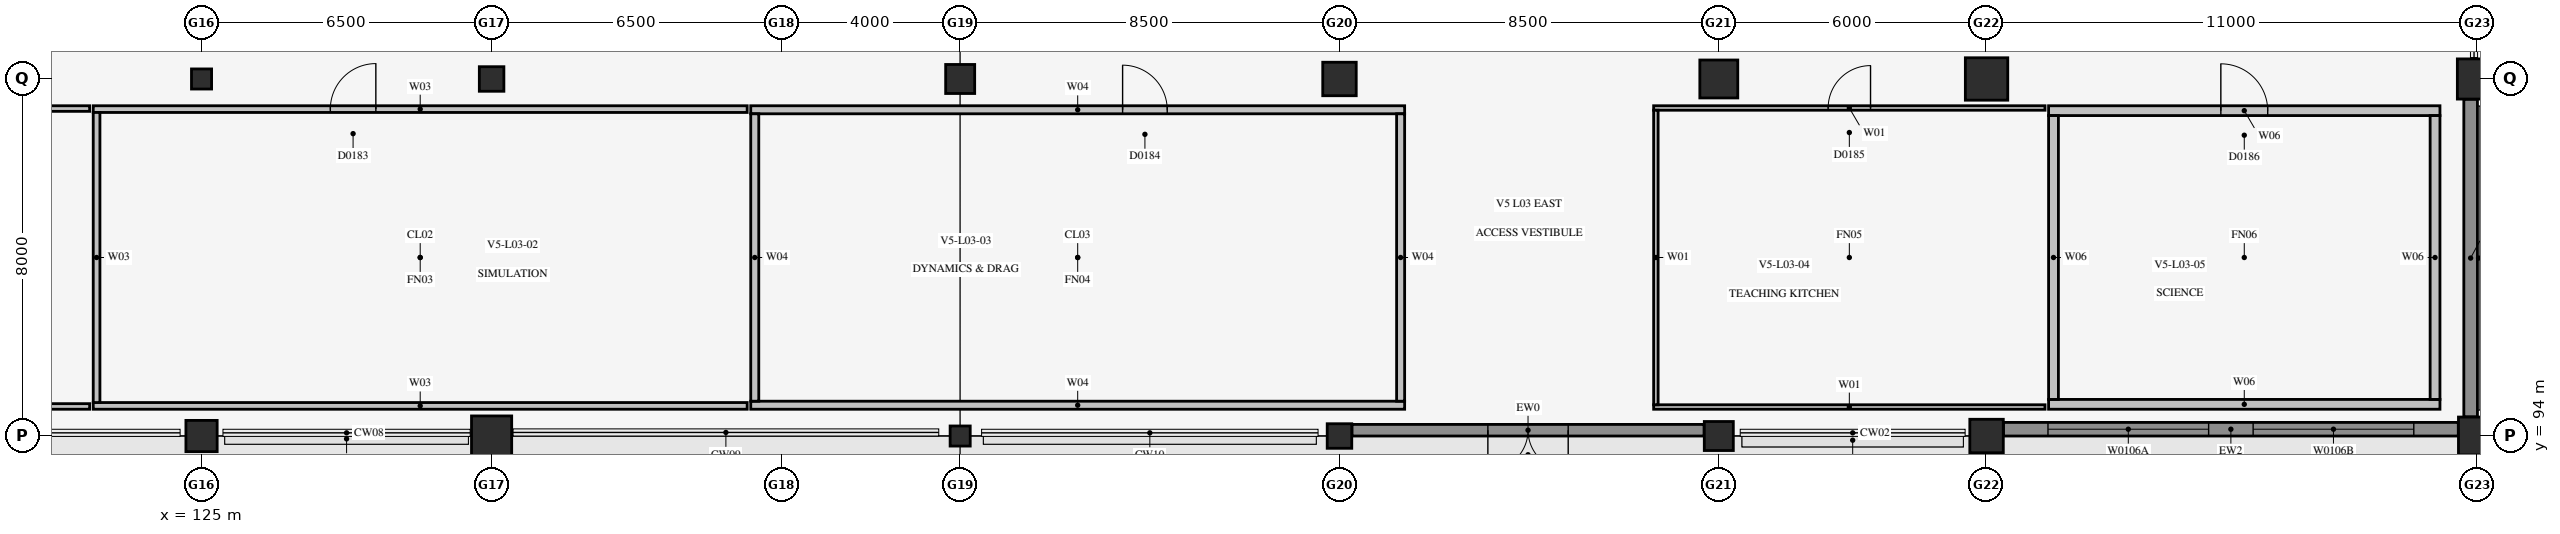
"""IFC4 building model, lengths in metres.
Left out: names, types, materials, properties, quantities, classifications, styles, units other than length and angle.
Written with IfcOpenShell. Run it as: python <this file> out.ifc"""

import sys

from ifc_helpers import new_model, si_unit, direction, frame, frame_2d, origin, origin_2d, place, context, subcontext, project, spatial, rectangle, circle, extrude, element, fill, save


model = new_model("IFC4")
c1 = context("Model", 3, precision=1e-05, world=origin(), true_north=direction((0.0, 1.0)))
c2 = subcontext(c1, "Body", "Model", "MODEL_VIEW")
j1 = project(units=[si_unit("LENGTHUNIT", "METRE"), si_unit("PLANEANGLEUNIT", "RADIAN")], contexts=[c1])
p1 = place(None, origin())
s1 = spatial("IfcSite", under=j1, at=p1, CompositionType="ELEMENT")
p2 = place(p1, origin())
s2 = spatial("IfcBuilding", under=s1, at=p2, CompositionType="ELEMENT")
p3 = place(p2, frame((0.0, 0.0, 14.8)))
s3 = spatial("IfcBuildingStorey", under=s2, at=p3, CompositionType="ELEMENT", Elevation=14.8)
p4 = place(p3, frame((125.0, 94.0, 0.0), z_axis=(0.0, 0.0, 1.0), x_axis=(1.0, 0.0, 0.0)))
e1 = element("IfcColumn", 1, at=p4, inside=s3, PredefinedType="COLUMN", context=c2, shape_type="SweptSolid", body=[
    extrude(circle(Radius=0.35, at=origin_2d()), origin(), (0.0, 0.0, 1.0), 4.2),
])
p5 = place(p3, frame((125.0, 102.0, 0.0), z_axis=(0.0, 0.0, 1.0), x_axis=(1.0, 0.0, 0.0)))
e2 = element("IfcColumn", 2, at=p5, inside=s3, PredefinedType="COLUMN", context=c2, shape_type="SweptSolid", body=[
    extrude(rectangle(XDim=0.45, YDim=0.45, at=origin_2d()), origin(), (0.0, 0.0, 1.0), 4.2),
])
p6 = place(p3, frame((131.5, 94.0, 0.0), z_axis=(0.0, 0.0, 1.0), x_axis=(1.0, 0.0, 0.0)))
e3 = element("IfcColumn", 3, at=p6, inside=s3, PredefinedType="COLUMN", context=c2, shape_type="SweptSolid", body=[
    extrude(circle(Radius=0.45, at=origin_2d()), origin(), (0.0, 0.0, 1.0), 4.2),
])
p7 = place(p3, frame((131.5, 102.0, 0.0), z_axis=(0.0, 0.0, 1.0), x_axis=(1.0, 0.0, 0.0)))
e4 = element("IfcColumn", 4, at=p7, inside=s3, PredefinedType="COLUMN", context=c2, shape_type="SweptSolid", body=[
    extrude(rectangle(XDim=0.55, YDim=0.55, at=origin_2d()), origin(), (0.0, 0.0, 1.0), 4.2),
])
p8 = place(p3, frame((142.0, 94.0, 0.0), z_axis=(0.0, 0.0, 1.0), x_axis=(1.0, 0.0, 0.0)))
e5 = element("IfcColumn", 5, at=p8, inside=s3, PredefinedType="COLUMN", context=c2, shape_type="SweptSolid", body=[
    extrude(rectangle(XDim=0.45, YDim=0.45, at=origin_2d()), origin(), (0.0, 0.0, 1.0), 4.2),
])
p9 = place(p3, frame((142.0, 102.0, 0.0), z_axis=(0.0, 0.0, 1.0), x_axis=(1.0, 0.0, 0.0)))
e6 = element("IfcColumn", 6, at=p9, inside=s3, PredefinedType="COLUMN", context=c2, shape_type="SweptSolid", body=[
    extrude(rectangle(XDim=0.65, YDim=0.65, at=origin_2d()), origin(), (0.0, 0.0, 1.0), 4.2),
])
p10 = place(p3, frame((150.5, 94.0, 0.0), z_axis=(0.0, 0.0, 1.0), x_axis=(1.0, 0.0, 0.0)))
e7 = element("IfcColumn", 7, at=p10, inside=s3, PredefinedType="COLUMN", context=c2, shape_type="SweptSolid", body=[
    extrude(rectangle(XDim=0.55, YDim=0.55, at=origin_2d()), origin(), (0.0, 0.0, 1.0), 4.2),
])
p11 = place(p3, frame((150.5, 102.0, 0.0), z_axis=(0.0, 0.0, 1.0), x_axis=(1.0, 0.0, 0.0)))
e8 = element("IfcColumn", 8, at=p11, inside=s3, PredefinedType="COLUMN", context=c2, shape_type="SweptSolid", body=[
    extrude(rectangle(XDim=0.75, YDim=0.75, at=origin_2d()), origin(), (0.0, 0.0, 1.0), 4.2),
])
p12 = place(p3, frame((159.0, 94.0, 0.0), z_axis=(0.0, 0.0, 1.0), x_axis=(1.0, 0.0, 0.0)))
e9 = element("IfcColumn", 9, at=p12, inside=s3, PredefinedType="COLUMN", context=c2, shape_type="SweptSolid", body=[
    extrude(rectangle(XDim=0.65, YDim=0.65, at=origin_2d()), origin(), (0.0, 0.0, 1.0), 4.2),
])
p13 = place(p3, frame((159.0, 102.0, 0.0), z_axis=(0.0, 0.0, 1.0), x_axis=(1.0, 0.0, 0.0)))
e10 = element("IfcColumn", 10, at=p13, inside=s3, PredefinedType="COLUMN", context=c2, shape_type="SweptSolid", body=[
    extrude(rectangle(XDim=0.85, YDim=0.85, at=origin_2d()), origin(), (0.0, 0.0, 1.0), 4.2),
])
p14 = place(p3, frame((165.0, 94.0, 0.0), z_axis=(0.0, 0.0, 1.0), x_axis=(1.0, 0.0, 0.0)))
e11 = element("IfcColumn", 11, at=p14, inside=s3, PredefinedType="COLUMN", context=c2, shape_type="SweptSolid", body=[
    extrude(rectangle(XDim=0.75, YDim=0.75, at=origin_2d()), origin(), (0.0, 0.0, 1.0), 4.2),
])
p15 = place(p3, frame((165.0, 102.0, 0.0), z_axis=(0.0, 0.0, 1.0), x_axis=(1.0, 0.0, 0.0)))
e12 = element("IfcColumn", 12, at=p15, inside=s3, PredefinedType="COLUMN", context=c2, shape_type="SweptSolid", body=[
    extrude(rectangle(XDim=0.95, YDim=0.95, at=origin_2d()), origin(), (0.0, 0.0, 1.0), 4.2),
])
p16 = place(p3, frame((176.0, 94.0, 0.0), z_axis=(0.0, 0.0, 1.0), x_axis=(1.0, 0.0, 0.0)))
e13 = element("IfcColumn", 13, at=p16, inside=s3, PredefinedType="COLUMN", context=c2, shape_type="SweptSolid", body=[
    extrude(rectangle(XDim=0.85, YDim=0.85, at=origin_2d()), origin(), (0.0, 0.0, 1.0), 4.2),
])
p17 = place(p3, frame((176.0, 102.0, 0.0), z_axis=(0.0, 0.0, 1.0), x_axis=(1.0, 0.0, 0.0)))
e14 = element("IfcColumn", 14, at=p17, inside=s3, PredefinedType="COLUMN", context=c2, shape_type="SweptSolid", body=[
    extrude(rectangle(XDim=0.9, YDim=0.9, at=origin_2d()), origin(), (0.0, 0.0, 1.0), 4.2),
])
p18 = place(p3, frame((107.84, 94.663, 0.0), z_axis=(0.0, 0.0, 1.0), x_axis=(1.0, 0.0, 0.0)))
e15 = element("IfcWall", 15, at=p18, inside=s3, PredefinedType="PARTITIONING", context=c2, shape_type="SweptSolid", body=[
    extrude(rectangle(XDim=14.653, YDim=0.125, at=frame_2d((7.326, 0.0))), origin(), (0.0, 0.0, 1.0), 3.805),
])
p19 = place(p3, frame((107.84, 101.337, 0.0), z_axis=(0.0, 0.0, 1.0), x_axis=(1.0, 0.0, 0.0)))
e16 = element("IfcWall", 16, at=p19, inside=s3, PredefinedType="PARTITIONING", context=c2, shape_type="SweptSolid", body=[
    extrude(rectangle(XDim=14.653, YDim=0.125, at=frame_2d((7.326, 0.0))), origin(), (0.0, 0.0, 1.0), 3.805),
])
p20 = place(p19, frame((3.588, 0.0, 0.0)))
e17 = element("IfcOpeningElement", 17, at=p20, cuts=e16, PredefinedType="OPENING", context=c2, shape_type="SweptSolid", body=[
    extrude(rectangle(XDim=1.4, YDim=2.2, at=frame_2d((0.7, 1.1))), frame((0.0, 0.074, 0.0), z_axis=(0.0, -1.0, 0.0), x_axis=(1.0, 0.0, 0.0)), (0.0, 0.0, 1.0), 0.149),
])
p21 = place(p3, frame((122.573, 94.675, 0.0), z_axis=(0.0, 0.0, 1.0), x_axis=(1.0, 0.0, 0.0)))
e18 = element("IfcWall", 18, at=p21, inside=s3, PredefinedType="PARTITIONING", context=c2, shape_type="SweptSolid", body=[
    extrude(rectangle(XDim=14.654, YDim=0.15, at=frame_2d((7.327, 0.0))), origin(), (0.0, 0.0, 1.0), 3.805),
])
p22 = place(p3, frame((122.573, 101.325, 0.0), z_axis=(0.0, 0.0, 1.0), x_axis=(1.0, 0.0, 0.0)))
e19 = element("IfcWall", 19, at=p22, inside=s3, PredefinedType="PARTITIONING", context=c2, shape_type="SweptSolid", body=[
    extrude(rectangle(XDim=14.654, YDim=0.15, at=frame_2d((7.327, 0.0))), origin(), (0.0, 0.0, 1.0), 3.805),
])
p23 = place(p22, frame((5.313, 0.0, 0.0)))
e20 = element("IfcOpeningElement", 20, at=p23, cuts=e19, PredefinedType="OPENING", context=c2, shape_type="SweptSolid", body=[
    extrude(rectangle(XDim=1.02, YDim=2.2, at=frame_2d((0.51, 1.1))), frame((0.0, 0.087, 0.0), z_axis=(0.0, -1.0, 0.0), x_axis=(1.0, 0.0, 0.0)), (0.0, 0.0, 1.0), 0.174),
])
p24 = place(p3, frame((122.648, 94.75, 0.0), z_axis=(0.0, 0.0, 1.0), x_axis=(0.0, 1.0, 0.0)))
e21 = element("IfcWall", 21, at=p24, inside=s3, PredefinedType="PARTITIONING", context=c2, shape_type="SweptSolid", body=[
    extrude(rectangle(XDim=6.5, YDim=0.15, at=frame_2d((3.25, 0.0))), origin(), (0.0, 0.0, 1.0), 3.805),
])
p25 = place(p3, frame((137.307, 94.69, 0.0), z_axis=(0.0, 0.0, 1.0), x_axis=(1.0, 0.0, 0.0)))
e22 = element("IfcWall", 22, at=p25, inside=s3, PredefinedType="PARTITIONING", context=c2, shape_type="SweptSolid", body=[
    extrude(rectangle(XDim=14.653, YDim=0.18, at=frame_2d((7.327, 0.0))), origin(), (0.0, 0.0, 1.0), 3.805),
])
p26 = place(p3, frame((137.307, 101.31, 0.0), z_axis=(0.0, 0.0, 1.0), x_axis=(1.0, 0.0, 0.0)))
e23 = element("IfcWall", 23, at=p26, inside=s3, PredefinedType="PARTITIONING", context=c2, shape_type="SweptSolid", body=[
    extrude(rectangle(XDim=14.653, YDim=0.18, at=frame_2d((7.327, 0.0))), origin(), (0.0, 0.0, 1.0), 3.805),
])
p27 = place(p26, frame((8.333, 0.0, 0.0)))
e24 = element("IfcOpeningElement", 24, at=p27, cuts=e23, PredefinedType="OPENING", context=c2, shape_type="SweptSolid", body=[
    extrude(rectangle(XDim=1.0, YDim=2.2, at=frame_2d((0.5, 1.1))), frame((0.0, 0.102, 0.0), z_axis=(0.0, -1.0, 0.0), x_axis=(1.0, 0.0, 0.0)), (0.0, 0.0, 1.0), 0.204),
])
for number, where, z_axis, x_axis in (
    (25, (151.87, 94.78, 0.0), (0.0, 0.0, 1.0), (0.0, 1.0, 0.0)),
    (26, (137.397, 94.78, 0.0), (0.0, 0.0, 1.0), (0.0, 1.0, 0.0)),
):
    element("IfcWall", number, at=place(p3, frame(where, z_axis=z_axis, x_axis=x_axis)), inside=s3, PredefinedType="PARTITIONING", context=c2, shape_type="SweptSolid", body=[
        extrude(rectangle(XDim=6.44, YDim=0.18, at=frame_2d((3.22, 0.0))), origin(), (0.0, 0.0, 1.0), 3.805),
    ])
p28 = place(p3, frame((157.54, 94.65, 0.0), z_axis=(0.0, 0.0, 1.0), x_axis=(1.0, 0.0, 0.0)))
e27 = element("IfcWall", 27, at=p28, inside=s3, PredefinedType="PARTITIONING", context=c2, shape_type="SweptSolid", body=[
    extrude(rectangle(XDim=8.77, YDim=0.1, at=frame_2d((4.385, 0.0))), origin(), (0.0, 0.0, 1.0), 3.805),
])
p29 = place(p3, frame((157.54, 101.35, 0.0), z_axis=(0.0, 0.0, 1.0), x_axis=(1.0, 0.0, 0.0)))
e28 = element("IfcWall", 28, at=p29, inside=s3, PredefinedType="PARTITIONING", context=c2, shape_type="SweptSolid", body=[
    extrude(rectangle(XDim=8.77, YDim=0.1, at=frame_2d((4.385, 0.0))), origin(), (0.0, 0.0, 1.0), 3.805),
])
p30 = place(p29, frame((3.91, 0.0, 0.0)))
e29 = element("IfcOpeningElement", 29, at=p30, cuts=e28, PredefinedType="OPENING", context=c2, shape_type="SweptSolid", body=[
    extrude(rectangle(XDim=0.95, YDim=2.15, at=frame_2d((0.475, 1.075))), frame((0.0, 0.062, 0.0), z_axis=(0.0, -1.0, 0.0), x_axis=(1.0, 0.0, 0.0)), (0.0, 0.0, 1.0), 0.124),
])
p31 = place(p3, frame((157.59, 94.7, 0.0), z_axis=(0.0, 0.0, 1.0), x_axis=(0.0, 1.0, 0.0)))
e30 = element("IfcWall", 30, at=p31, inside=s3, PredefinedType="PARTITIONING", context=c2, shape_type="SweptSolid", body=[
    extrude(rectangle(XDim=6.6, YDim=0.1, at=frame_2d((3.3, 0.0))), origin(), (0.0, 0.0, 1.0), 3.805),
])
p32 = place(p3, frame((166.39, 94.71, 0.0), z_axis=(0.0, 0.0, 1.0), x_axis=(1.0, 0.0, 0.0)))
e31 = element("IfcWall", 31, at=p32, inside=s3, PredefinedType="PLUMBINGWALL", context=c2, shape_type="SweptSolid", body=[
    extrude(rectangle(XDim=8.77, YDim=0.22, at=frame_2d((4.385, 0.0))), origin(), (0.0, 0.0, 1.0), 3.805),
])
p33 = place(p3, frame((166.39, 101.29, 0.0), z_axis=(0.0, 0.0, 1.0), x_axis=(1.0, 0.0, 0.0)))
e32 = element("IfcWall", 32, at=p33, inside=s3, PredefinedType="PLUMBINGWALL", context=c2, shape_type="SweptSolid", body=[
    extrude(rectangle(XDim=8.77, YDim=0.22, at=frame_2d((4.385, 0.0))), origin(), (0.0, 0.0, 1.0), 3.805),
])
p34 = place(p33, frame((3.86, 0.0, 0.0)))
e33 = element("IfcOpeningElement", 33, at=p34, cuts=e32, PredefinedType="OPENING", context=c2, shape_type="SweptSolid", body=[
    extrude(rectangle(XDim=1.05, YDim=2.15, at=frame_2d((0.525, 1.075))), frame((0.0, 0.122, 0.0), z_axis=(0.0, -1.0, 0.0), x_axis=(1.0, 0.0, 0.0)), (0.0, 0.0, 1.0), 0.244),
])
for number, where, z_axis, x_axis in (
    (34, (175.05, 94.82, 0.0), (0.0, 0.0, 1.0), (0.0, 1.0, 0.0)),
    (35, (166.5, 94.82, 0.0), (0.0, 0.0, 1.0), (0.0, 1.0, 0.0)),
):
    element("IfcWall", number, at=place(p3, frame(where, z_axis=z_axis, x_axis=x_axis)), inside=s3, PredefinedType="PLUMBINGWALL", context=c2, shape_type="SweptSolid", body=[
        extrude(rectangle(XDim=6.36, YDim=0.22, at=frame_2d((3.18, 0.0))), origin(), (0.0, 0.0, 1.0), 3.805),
    ])
p35 = place(p3, frame((150.779, 94.13, 0.0), z_axis=(0.0, 0.0, 1.0), x_axis=(1.0, 0.0, 0.0)))
e36 = element("IfcWall", 36, at=p35, inside=s3, PredefinedType="SOLIDWALL", context=c2, shape_type="SweptSolid", body=[
    extrude(rectangle(XDim=7.892, YDim=0.26, at=frame_2d((3.946, 0.0))), origin(), (0.0, 0.0, 1.0), 3.254),
])
p36 = place(p35, frame((3.046, 0.0, 0.0)))
e37 = element("IfcOpeningElement", 37, at=p36, cuts=e36, PredefinedType="OPENING", context=c2, shape_type="SweptSolid", body=[
    extrude(rectangle(XDim=1.8, YDim=2.4, at=frame_2d((0.9, 1.2))), frame((0.0, 0.142, 0.0), z_axis=(0.0, -1.0, 0.0), x_axis=(1.0, 0.0, 0.0)), (0.0, 0.0, 1.0), 0.284),
])
p37 = place(p3, frame((165.379, 94.153, 0.0), z_axis=(0.0, 0.0, 1.0), x_axis=(1.0, 0.0, 0.0)))
e38 = element("IfcWall", 38, at=p37, inside=s3, PredefinedType="SOLIDWALL", context=c2, shape_type="SweptSolid", body=[
    extrude(rectangle(XDim=10.192, YDim=0.305, at=frame_2d((5.096, 0.0))), origin(), (0.0, 0.0, 1.0), 3.377),
])
p38 = place(p37, frame((0.997, 0.0, 0.95)))
e39 = element("IfcOpeningElement", 39, at=p38, cuts=e38, PredefinedType="OPENING", context=c2, shape_type="SweptSolid", body=[
    extrude(rectangle(XDim=3.6, YDim=2.1, at=frame_2d((1.8, 1.05))), frame((0.0, 0.165, 0.0), z_axis=(0.0, -1.0, 0.0), x_axis=(1.0, 0.0, 0.0)), (0.0, 0.0, 1.0), 0.329),
])
p39 = place(p37, frame((5.595, 0.0, 0.95)))
e40 = element("IfcOpeningElement", 40, at=p39, cuts=e38, PredefinedType="OPENING", context=c2, shape_type="SweptSolid", body=[
    extrude(rectangle(XDim=3.6, YDim=2.1, at=frame_2d((1.8, 1.05))), frame((0.0, 0.165, 0.0), z_axis=(0.0, -1.0, 0.0), x_axis=(1.0, 0.0, 0.0)), (0.0, 0.0, 1.0), 0.329),
])
p40 = place(p3, frame((175.847, 94.429, 0.0), z_axis=(0.0, 0.0, 1.0), x_axis=(0.0, 1.0, 0.0)))
e41 = element("IfcWall", 41, at=p40, inside=s3, PredefinedType="SOLIDWALL", context=c2, shape_type="SweptSolid", body=[
    extrude(rectangle(XDim=7.117, YDim=0.305, at=frame_2d((3.559, 0.0))), origin(), (0.0, 0.0, 1.0), 3.254),
])
p41 = place(p23, frame((1.02, 0.0, 0.0), z_axis=(0.0, 0.0, 1.0), x_axis=(-1.0, 0.0, 0.0)))
e42 = element("IfcDoor", 42, at=p41, inside=s3, OperationType="SINGLE_SWING_RIGHT", PredefinedType="DOOR", context=c2, shape_type="SweptSolid", body=[
    extrude(rectangle(XDim=1.02, YDim=2.2, at=frame_2d((0.51, 1.1))), frame((0.0, 0.025, 0.0), z_axis=(0.0, -1.0, 0.0), x_axis=(1.0, 0.0, 0.0)), (0.0, 0.0, 1.0), 0.05),
])
fill(e20, e42)
p42 = place(p27, frame((1.0, 0.0, 0.0), z_axis=(0.0, 0.0, 1.0), x_axis=(-1.0, 0.0, 0.0)))
e43 = element("IfcDoor", 43, at=p42, inside=s3, OperationType="SINGLE_SWING_LEFT", PredefinedType="DOOR", context=c2, shape_type="SweptSolid", body=[
    extrude(rectangle(XDim=1.0, YDim=2.2, at=frame_2d((0.5, 1.1))), frame((0.0, 0.025, 0.0), z_axis=(0.0, -1.0, 0.0), x_axis=(1.0, 0.0, 0.0)), (0.0, 0.0, 1.0), 0.05),
])
fill(e24, e43)
p43 = place(p30, frame((0.95, 0.0, 0.0), z_axis=(0.0, 0.0, 1.0), x_axis=(-1.0, 0.0, 0.0)))
e44 = element("IfcDoor", 44, at=p43, inside=s3, OperationType="SINGLE_SWING_RIGHT", PredefinedType="DOOR", context=c2, shape_type="SweptSolid", body=[
    extrude(rectangle(XDim=0.95, YDim=2.15, at=frame_2d((0.475, 1.075))), frame((0.0, 0.025, 0.0), z_axis=(0.0, -1.0, 0.0), x_axis=(1.0, 0.0, 0.0)), (0.0, 0.0, 1.0), 0.05),
])
fill(e29, e44)
p44 = place(p34, frame((1.05, 0.0, 0.0), z_axis=(0.0, 0.0, 1.0), x_axis=(-1.0, 0.0, 0.0)))
e45 = element("IfcDoor", 45, at=p44, inside=s3, OperationType="SINGLE_SWING_LEFT", PredefinedType="DOOR", context=c2, shape_type="SweptSolid", body=[
    extrude(rectangle(XDim=1.05, YDim=2.15, at=frame_2d((0.525, 1.075))), frame((0.0, 0.025, 0.0), z_axis=(0.0, -1.0, 0.0), x_axis=(1.0, 0.0, 0.0)), (0.0, 0.0, 1.0), 0.05),
])
fill(e33, e45)
p45 = place(p36, frame((1.8, 0.0, 0.0), z_axis=(0.0, 0.0, 1.0), x_axis=(-1.0, 0.0, 0.0)))
e46 = element("IfcDoor", 46, at=p45, inside=s3, OperationType="DOUBLE_DOOR_SINGLE_SWING", PredefinedType="DOOR", context=c2, shape_type="SweptSolid", body=[
    extrude(rectangle(XDim=1.8, YDim=2.4, at=frame_2d((0.9, 1.2))), frame((0.0, 0.025, 0.0), z_axis=(0.0, -1.0, 0.0), x_axis=(1.0, 0.0, 0.0)), (0.0, 0.0, 1.0), 0.05),
])
fill(e37, e46)
p46 = place(p38, origin())
e47 = element("IfcWindow", 47, at=p46, inside=s3, PartitioningType="SINGLE_PANEL", PredefinedType="WINDOW", context=c2, shape_type="SweptSolid", body=[
    extrude(rectangle(XDim=3.6, YDim=2.1, at=frame_2d((1.8, 1.05))), frame((0.0, 0.03, 0.0), z_axis=(0.0, -1.0, 0.0), x_axis=(1.0, 0.0, 0.0)), (0.0, 0.0, 1.0), 0.06),
])
fill(e39, e47)
p47 = place(p39, origin())
e48 = element("IfcWindow", 48, at=p47, inside=s3, PartitioningType="SINGLE_PANEL", PredefinedType="WINDOW", context=c2, shape_type="SweptSolid", body=[
    extrude(rectangle(XDim=3.6, YDim=2.1, at=frame_2d((1.8, 1.05))), frame((0.0, 0.03, 0.0), z_axis=(0.0, -1.0, 0.0), x_axis=(1.0, 0.0, 0.0)), (0.0, 0.0, 1.0), 0.06),
])
fill(e40, e48)
save(model, sys.argv[1])
